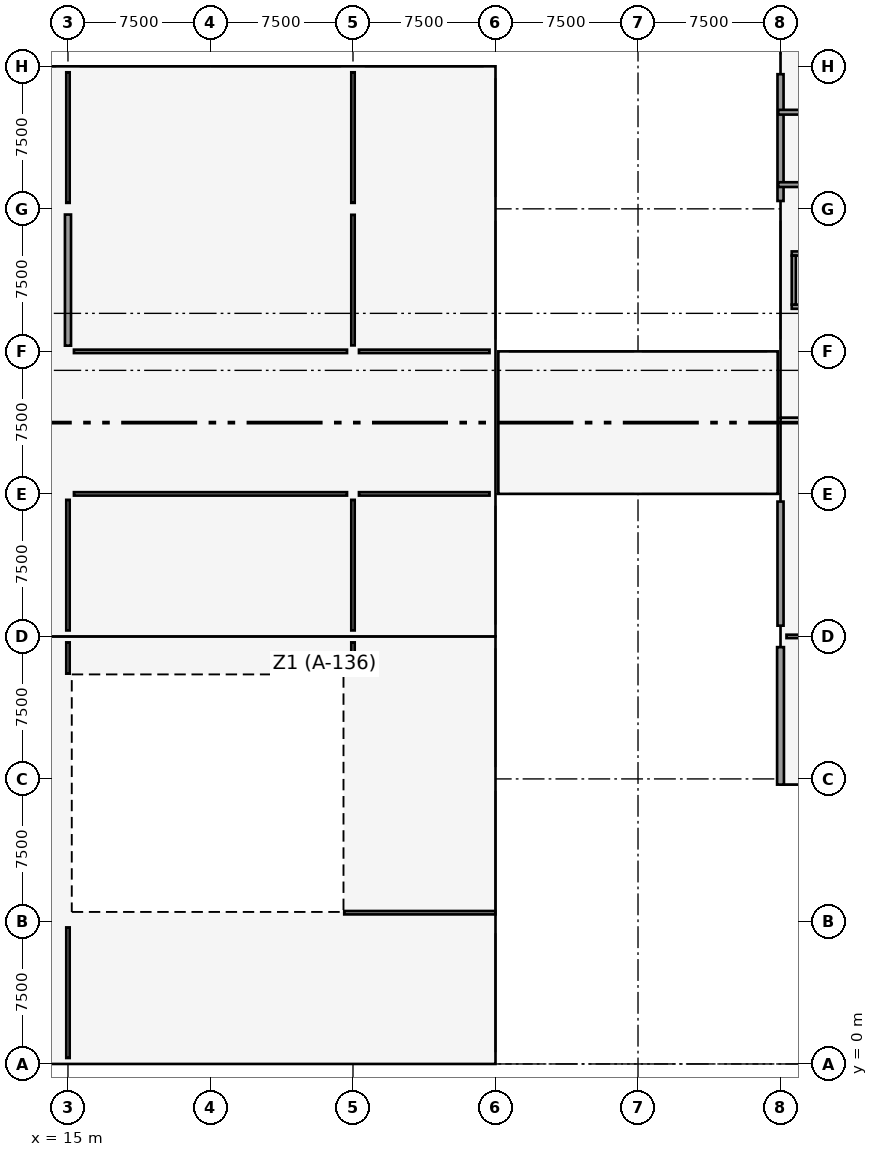
"""IFC4 building model, lengths in metres.
Left out: names, types, materials, properties, quantities, classifications, styles, units other than length and angle.
Written with IfcOpenShell. Run it as: python <this file> out.ifc"""

import sys

from ifc_helpers import new_model, si_unit, direction, frame, frame_2d, origin, origin_2d, place, context, subcontext, project, spatial, rectangle, extrude, element, fill, save


model = new_model("IFC4")
c1 = context("Model", 3, precision=1e-05, world=origin(), true_north=direction((0.0, 1.0)))
c2 = subcontext(c1, "Body", "Model", "MODEL_VIEW")
j1 = project(units=[si_unit("LENGTHUNIT", "METRE"), si_unit("PLANEANGLEUNIT", "RADIAN")], contexts=[c1])
p1 = place(None, origin())
s1 = spatial("IfcSite", under=j1, at=p1, CompositionType="ELEMENT")
p2 = place(p1, origin())
s2 = spatial("IfcBuilding", under=s1, at=p2, CompositionType="ELEMENT")
p3 = place(p2, frame((0.0, 0.0, 9.0)))
s3 = spatial("IfcBuildingStorey", under=s2, at=p3, CompositionType="ELEMENT", Elevation=9.0)
p4 = place(p3, frame((52.5, 22.5, 0.0), z_axis=(0.0, 0.0, 1.0), x_axis=(1.0, 0.0, 0.0)))
e1 = element("IfcColumn", 1, at=p4, inside=s3, PredefinedType="COLUMN", context=c2, shape_type="SweptSolid", body=[
    extrude(rectangle(XDim=0.6, YDim=1.1, at=origin_2d()), origin(), (0.0, 0.0, 1.0), 4.2),
])
for number, where, z_axis, x_axis in (
    (2, (52.5, 30.0, 0.0), (0.0, 0.0, 1.0), (1.0, 0.0, 0.0)),
    (3, (52.5, 37.5, 0.0), (0.0, 0.0, 1.0), (1.0, 0.0, 0.0)),
    (4, (52.5, 45.0, 0.0), (0.0, 0.0, 1.0), (1.0, 0.0, 0.0)),
    (5, (52.5, 52.5, 0.0), (0.0, 0.0, 1.0), (1.0, 0.0, 0.0)),
):
    element("IfcColumn", number, at=place(p3, frame(where, z_axis=z_axis, x_axis=x_axis)), inside=s3, PredefinedType="COLUMN", context=c2, shape_type="SweptSolid", body=[
        extrude(rectangle(XDim=0.8, YDim=0.8, at=origin_2d()), origin(), (0.0, 0.0, 1.0), 4.2),
    ])
for number, where, z_axis, x_axis in (
    (6, (15.0, 0.0, 0.0), (0.0, 0.0, 1.0), (1.0, 0.0, 0.0)),
    (7, (15.0, 7.5, 0.0), (0.0, 0.0, 1.0), (1.0, 0.0, 0.0)),
    (8, (15.0, 15.0, 0.0), (0.0, 0.0, 1.0), (1.0, 0.0, 0.0)),
    (9, (15.0, 22.5, 0.0), (0.0, 0.0, 1.0), (1.0, 0.0, 0.0)),
    (10, (15.0, 30.0, 0.0), (0.0, 0.0, 1.0), (1.0, 0.0, 0.0)),
    (11, (15.0, 37.5, 0.0), (0.0, 0.0, 1.0), (1.0, 0.0, 0.0)),
    (12, (15.0, 45.0, 0.0), (0.0, 0.0, 1.0), (1.0, 0.0, 0.0)),
    (13, (15.0, 52.5, 0.0), (0.0, 0.0, 1.0), (1.0, 0.0, 0.0)),
    (14, (30.0, 0.0, 0.0), (0.0, 0.0, 1.0), (1.0, 0.0, 0.0)),
    (15, (30.0, 7.5, 0.0), (0.0, 0.0, 1.0), (1.0, 0.0, 0.0)),
    (16, (30.0, 15.0, 0.0), (0.0, 0.0, 1.0), (1.0, 0.0, 0.0)),
    (17, (30.0, 22.5, 0.0), (0.0, 0.0, 1.0), (1.0, 0.0, 0.0)),
    (18, (30.0, 30.0, 0.0), (0.0, 0.0, 1.0), (1.0, 0.0, 0.0)),
    (19, (30.0, 37.5, 0.0), (0.0, 0.0, 1.0), (1.0, 0.0, 0.0)),
    (20, (30.0, 45.0, 0.0), (0.0, 0.0, 1.0), (1.0, 0.0, 0.0)),
    (21, (30.0, 52.5, 0.0), (0.0, 0.0, 1.0), (1.0, 0.0, 0.0)),
    (22, (37.5, 0.0, 0.0), (0.0, 0.0, 1.0), (1.0, 0.0, 0.0)),
    (23, (37.5, 7.5, 0.0), (0.0, 0.0, 1.0), (1.0, 0.0, 0.0)),
    (24, (37.5, 15.0, 0.0), (0.0, 0.0, 1.0), (1.0, 0.0, 0.0)),
    (25, (37.5, 22.5, 0.0), (0.0, 0.0, 1.0), (1.0, 0.0, 0.0)),
    (26, (37.5, 30.0, 0.0), (0.0, 0.0, 1.0), (1.0, 0.0, 0.0)),
    (27, (37.5, 37.5, 0.0), (0.0, 0.0, 1.0), (1.0, 0.0, 0.0)),
    (28, (37.5, 45.0, 0.0), (0.0, 0.0, 1.0), (1.0, 0.0, 0.0)),
    (29, (37.5, 52.5, 0.0), (0.0, 0.0, 1.0), (1.0, 0.0, 0.0)),
):
    element("IfcColumn", number, at=place(p3, frame(where, z_axis=z_axis, x_axis=x_axis)), inside=s3, PredefinedType="COLUMN", context=c2, shape_type="SweptSolid", body=[
        extrude(rectangle(XDim=0.6, YDim=0.6, at=origin_2d()), origin(), (0.0, 0.0, 1.0), 4.2),
    ])
p5 = place(p3, frame((15.0, 37.8, 0.0), z_axis=(0.0, 0.0, 1.0), x_axis=(0.0, 1.0, 0.0)))
e30 = element("IfcWall", 30, at=p5, inside=s3, PredefinedType="SHEAR", context=c2, shape_type="SweptSolid", body=[
    extrude(rectangle(XDim=6.9, YDim=0.32, at=frame_2d((3.45, 0.0))), origin(), (0.0, 0.0, 1.0), 3.9),
])
p6 = place(p3, frame((52.5, 14.7, 0.0), z_axis=(0.0, 0.0, 1.0), x_axis=(0.0, 1.0, 0.0)))
e31 = element("IfcWall", 31, at=p6, inside=s3, PredefinedType="SOLIDWALL", context=c2, shape_type="SweptSolid", body=[
    extrude(rectangle(XDim=7.235, YDim=0.36, at=frame_2d((3.618, 0.0))), origin(), (0.0, 0.0, 1.0), 2.69),
])
p7 = place(p3, frame((52.5, 23.065, 0.0), z_axis=(0.0, 0.0, 1.0), x_axis=(0.0, 1.0, 0.0)))
e32 = element("IfcWall", 32, at=p7, inside=s3, PredefinedType="SOLIDWALL", context=c2, shape_type="SweptSolid", body=[
    extrude(rectangle(XDim=6.53, YDim=0.32, at=frame_2d((3.265, 0.0))), origin(), (0.0, 0.0, 1.0), 2.69),
])
p8 = place(p3, frame((52.5, 45.415, 0.0), z_axis=(0.0, 0.0, 1.0), x_axis=(0.0, 1.0, 0.0)))
e33 = element("IfcWall", 33, at=p8, inside=s3, PredefinedType="SOLIDWALL", context=c2, shape_type="SweptSolid", body=[
    extrude(rectangle(XDim=6.67, YDim=0.32, at=frame_2d((3.335, 0.0))), origin(), (0.0, 0.0, 1.0), 2.97),
])
p9 = place(p3, frame((52.38, 46.275, 0.0), z_axis=(0.0, 0.0, 1.0), x_axis=(1.0, 0.0, 0.0)))
e34 = element("IfcWall", 34, at=p9, inside=s3, PredefinedType="SOLIDWALL", context=c2, shape_type="SweptSolid", body=[
    extrude(rectangle(XDim=7.26, YDim=0.25, at=frame_2d((3.63, 0.0))), origin(), (0.0, 0.0, 1.0), 3.92),
])
p10 = place(p9, frame((0.62, 0.0, 0.0)))
e35 = element("IfcOpeningElement", 35, at=p10, cuts=e34, PredefinedType="OPENING", context=c2, shape_type="SweptSolid", body=[
    extrude(rectangle(XDim=1.1, YDim=2.15, at=frame_2d((0.55, 1.075))), frame((0.0, 0.135, 0.0), z_axis=(0.0, -1.0, 0.0), x_axis=(1.0, 0.0, 0.0)), (0.0, 0.0, 1.0), 0.27),
])
p11 = place(p3, frame((52.38, 50.085, 0.0), z_axis=(0.0, 0.0, 1.0), x_axis=(1.0, 0.0, 0.0)))
e36 = element("IfcWall", 36, at=p11, inside=s3, PredefinedType="SOLIDWALL", context=c2, shape_type="SweptSolid", body=[
    extrude(rectangle(XDim=7.26, YDim=0.25, at=frame_2d((3.63, 0.0))), origin(), (0.0, 0.0, 1.0), 3.92),
])
p12 = place(p11, frame((0.62, 0.0, 0.0)))
e37 = element("IfcOpeningElement", 37, at=p12, cuts=e36, PredefinedType="OPENING", context=c2, shape_type="SweptSolid", body=[
    extrude(rectangle(XDim=1.1, YDim=2.15, at=frame_2d((0.55, 1.075))), frame((0.0, 0.135, 0.0), z_axis=(0.0, -1.0, 0.0), x_axis=(1.0, 0.0, 0.0)), (0.0, 0.0, 1.0), 0.27),
])
for number, where, z_axis, x_axis in (
    (38, (53.09, 39.85, 0.0), (0.0, 0.0, 1.0), (1.0, 0.0, 0.0)),
    (39, (53.09, 42.65, 0.0), (0.0, 0.0, 1.0), (1.0, 0.0, 0.0)),
):
    element("IfcWall", number, at=place(p3, frame(where, z_axis=z_axis, x_axis=x_axis)), inside=s3, PredefinedType="SOLIDWALL", context=c2, shape_type="SweptSolid", body=[
        extrude(rectangle(XDim=2.62, YDim=0.22, at=frame_2d((1.31, 0.0))), origin(), (0.0, 0.0, 1.0), 3.92),
    ])
p13 = place(p3, frame((53.2, 39.96, 0.0), z_axis=(0.0, 0.0, 1.0), x_axis=(0.0, 1.0, 0.0)))
e40 = element("IfcWall", 40, at=p13, inside=s3, PredefinedType="SOLIDWALL", context=c2, shape_type="SweptSolid", body=[
    extrude(rectangle(XDim=2.58, YDim=0.22, at=frame_2d((1.29, 0.0))), origin(), (0.0, 0.0, 1.0), 3.92),
])
p14 = place(p3, frame((29.54, 7.96, 0.0), z_axis=(0.0, 0.0, 1.0), x_axis=(1.0, 0.0, 0.0)))
e41 = element("IfcWall", 41, at=p14, inside=s3, PredefinedType="PARTITIONING", context=c2, shape_type="SweptSolid", body=[
    extrude(rectangle(XDim=7.96, YDim=0.18, at=frame_2d((3.98, 0.0))), origin(), (0.0, 0.0, 1.0), 2.87),
])
p15 = place(p14, frame((3.46, 0.0, 0.0)))
e42 = element("IfcOpeningElement", 42, at=p15, cuts=e41, PredefinedType="OPENING", context=c2, shape_type="SweptSolid", body=[
    extrude(rectangle(XDim=1.5, YDim=2.16, at=frame_2d((0.75, 1.08))), frame((0.0, 0.1, 0.0), z_axis=(0.0, -1.0, 0.0), x_axis=(1.0, 0.0, 0.0)), (0.0, 0.0, 1.0), 0.2),
])
p16 = place(p3, frame((15.314, 30.0, 0.0), z_axis=(0.0, 0.0, 1.0), x_axis=(1.0, 0.0, 0.0)))
e43 = element("IfcWall", 43, at=p16, inside=s3, PredefinedType="PARTITIONING", context=c2, shape_type="SweptSolid", body=[
    extrude(rectangle(XDim=14.372, YDim=0.18, at=frame_2d((7.186, 0.0))), origin(), (0.0, 0.0, 1.0), 2.87),
])
p17 = place(p3, frame((30.314, 30.0, 0.0), z_axis=(0.0, 0.0, 1.0), x_axis=(1.0, 0.0, 0.0)))
e44 = element("IfcWall", 44, at=p17, inside=s3, PredefinedType="PARTITIONING", context=c2, shape_type="SweptSolid", body=[
    extrude(rectangle(XDim=6.872, YDim=0.18, at=frame_2d((3.436, 0.0))), origin(), (0.0, 0.0, 1.0), 2.87),
])
p18 = place(p17, frame((2.686, 0.0, 0.0)))
e45 = element("IfcOpeningElement", 45, at=p18, cuts=e44, PredefinedType="OPENING", context=c2, shape_type="SweptSolid", body=[
    extrude(rectangle(XDim=1.5, YDim=2.16, at=frame_2d((0.75, 1.08))), frame((0.0, 0.1, 0.0), z_axis=(0.0, -1.0, 0.0), x_axis=(1.0, 0.0, 0.0)), (0.0, 0.0, 1.0), 0.2),
])
p19 = place(p3, frame((15.314, 37.5, 0.0), z_axis=(0.0, 0.0, 1.0), x_axis=(1.0, 0.0, 0.0)))
e46 = element("IfcWall", 46, at=p19, inside=s3, PredefinedType="PARTITIONING", context=c2, shape_type="SweptSolid", body=[
    extrude(rectangle(XDim=14.372, YDim=0.18, at=frame_2d((7.186, 0.0))), origin(), (0.0, 0.0, 1.0), 2.87),
])
p20 = place(p3, frame((30.314, 37.5, 0.0), z_axis=(0.0, 0.0, 1.0), x_axis=(1.0, 0.0, 0.0)))
e47 = element("IfcWall", 47, at=p20, inside=s3, PredefinedType="PARTITIONING", context=c2, shape_type="SweptSolid", body=[
    extrude(rectangle(XDim=6.872, YDim=0.18, at=frame_2d((3.436, 0.0))), origin(), (0.0, 0.0, 1.0), 2.87),
])
p21 = place(p20, frame((2.711, 0.0, 0.0)))
e48 = element("IfcOpeningElement", 48, at=p21, cuts=e47, PredefinedType="OPENING", context=c2, shape_type="SweptSolid", body=[
    extrude(rectangle(XDim=1.45, YDim=2.15, at=frame_2d((0.725, 1.075))), frame((0.0, 0.1, 0.0), z_axis=(0.0, -1.0, 0.0), x_axis=(1.0, 0.0, 0.0)), (0.0, 0.0, 1.0), 0.2),
])
p22 = place(p3, frame((30.0, 20.54, 0.0), z_axis=(0.0, 0.0, 1.0), x_axis=(0.0, 1.0, 0.0)))
e49 = element("IfcWall", 49, at=p22, inside=s3, PredefinedType="PARTITIONING", context=c2, shape_type="SweptSolid", body=[
    extrude(rectangle(XDim=1.646, YDim=0.18, at=frame_2d((0.823, 0.0))), origin(), (0.0, 0.0, 1.0), 2.82),
])
p23 = place(p3, frame((30.0, 22.814, 0.0), z_axis=(0.0, 0.0, 1.0), x_axis=(0.0, 1.0, 0.0)))
e50 = element("IfcWall", 50, at=p23, inside=s3, PredefinedType="PARTITIONING", context=c2, shape_type="SweptSolid", body=[
    extrude(rectangle(XDim=6.872, YDim=0.18, at=frame_2d((3.436, 0.0))), origin(), (0.0, 0.0, 1.0), 2.82),
])
for number, where, z_axis, x_axis in (
    (51, (30.0, 37.814, 0.0), (0.0, 0.0, 1.0), (0.0, 1.0, 0.0)),
    (52, (30.0, 45.314, 0.0), (0.0, 0.0, 1.0), (0.0, 1.0, 0.0)),
):
    element("IfcWall", number, at=place(p3, frame(where, z_axis=z_axis, x_axis=x_axis)), inside=s3, PredefinedType="PARTITIONING", context=c2, shape_type="SweptSolid", body=[
        extrude(rectangle(XDim=6.872, YDim=0.18, at=frame_2d((3.436, 0.0))), origin(), (0.0, 0.0, 1.0), 2.87),
    ])
p24 = place(p3, frame((15.0, 0.314, 0.0), z_axis=(0.0, 0.0, 1.0), x_axis=(0.0, 1.0, 0.0)))
e53 = element("IfcWall", 53, at=p24, inside=s3, PredefinedType="PARTITIONING", context=c2, shape_type="SweptSolid", body=[
    extrude(rectangle(XDim=6.872, YDim=0.18, at=frame_2d((3.436, 0.0))), origin(), (0.0, 0.0, 1.0), 2.87),
])
p25 = place(p24, frame((2.686, 0.0, 0.0)))
e54 = element("IfcOpeningElement", 54, at=p25, cuts=e53, PredefinedType="OPENING", context=c2, shape_type="SweptSolid", body=[
    extrude(rectangle(XDim=1.5, YDim=2.16, at=frame_2d((0.75, 1.08))), frame((0.0, 0.1, 0.0), z_axis=(0.0, -1.0, 0.0), x_axis=(1.0, 0.0, 0.0)), (0.0, 0.0, 1.0), 0.2),
])
p26 = place(p3, frame((15.0, 20.54, 0.0), z_axis=(0.0, 0.0, 1.0), x_axis=(0.0, 1.0, 0.0)))
e55 = element("IfcWall", 55, at=p26, inside=s3, PredefinedType="PARTITIONING", context=c2, shape_type="SweptSolid", body=[
    extrude(rectangle(XDim=1.646, YDim=0.18, at=frame_2d((0.823, 0.0))), origin(), (0.0, 0.0, 1.0), 2.87),
])
p27 = place(p3, frame((15.0, 22.814, 0.0), z_axis=(0.0, 0.0, 1.0), x_axis=(0.0, 1.0, 0.0)))
e56 = element("IfcWall", 56, at=p27, inside=s3, PredefinedType="PARTITIONING", context=c2, shape_type="SweptSolid", body=[
    extrude(rectangle(XDim=6.872, YDim=0.18, at=frame_2d((3.436, 0.0))), origin(), (0.0, 0.0, 1.0), 2.87),
])
p28 = place(p27, frame((2.711, 0.0, 0.0)))
e57 = element("IfcOpeningElement", 57, at=p28, cuts=e56, PredefinedType="OPENING", context=c2, shape_type="SweptSolid", body=[
    extrude(rectangle(XDim=1.45, YDim=2.15, at=frame_2d((0.725, 1.075))), frame((0.0, 0.1, 0.0), z_axis=(0.0, -1.0, 0.0), x_axis=(1.0, 0.0, 0.0)), (0.0, 0.0, 1.0), 0.2),
])
p29 = place(p3, frame((15.0, 45.314, 0.0), z_axis=(0.0, 0.0, 1.0), x_axis=(0.0, 1.0, 0.0)))
e58 = element("IfcWall", 58, at=p29, inside=s3, PredefinedType="PARTITIONING", context=c2, shape_type="SweptSolid", body=[
    extrude(rectangle(XDim=6.872, YDim=0.18, at=frame_2d((3.436, 0.0))), origin(), (0.0, 0.0, 1.0), 2.87),
])
p30 = place(p29, frame((2.786, 0.0, 0.0)))
e59 = element("IfcOpeningElement", 59, at=p30, cuts=e58, PredefinedType="OPENING", context=c2, shape_type="SweptSolid", body=[
    extrude(rectangle(XDim=1.3, YDim=2.15, at=frame_2d((0.65, 1.075))), frame((0.0, 0.1, 0.0), z_axis=(0.0, -1.0, 0.0), x_axis=(1.0, 0.0, 0.0)), (0.0, 0.0, 1.0), 0.2),
])
p31 = place(p3, frame((52.814, 22.5, 0.0), z_axis=(0.0, 0.0, 1.0), x_axis=(1.0, 0.0, 0.0)))
e60 = element("IfcWall", 60, at=p31, inside=s3, PredefinedType="PARTITIONING", context=c2, shape_type="SweptSolid", body=[
    extrude(rectangle(XDim=6.772, YDim=0.18, at=frame_2d((3.386, 0.0))), origin(), (0.0, 0.0, 1.0), 2.69),
])
p32 = place(p31, frame((2.786, 0.0, 0.0)))
e61 = element("IfcOpeningElement", 61, at=p32, cuts=e60, PredefinedType="OPENING", context=c2, shape_type="SweptSolid", body=[
    extrude(rectangle(XDim=1.3, YDim=2.15, at=frame_2d((0.65, 1.075))), frame((0.0, 0.1, 0.0), z_axis=(0.0, -1.0, 0.0), x_axis=(1.0, 0.0, 0.0)), (0.0, 0.0, 1.0), 0.2),
])
p33 = place(p10, origin())
e62 = element("IfcDoor", 62, at=p33, inside=s3, OperationType="SINGLE_SWING_LEFT", PredefinedType="DOOR", context=c2, shape_type="SweptSolid", body=[
    extrude(rectangle(XDim=1.1, YDim=2.15, at=frame_2d((0.55, 1.075))), frame((0.0, 0.025, 0.0), z_axis=(0.0, -1.0, 0.0), x_axis=(1.0, 0.0, 0.0)), (0.0, 0.0, 1.0), 0.05),
])
fill(e35, e62)
p34 = place(p12, frame((1.1, 0.0, 0.0), z_axis=(0.0, 0.0, 1.0), x_axis=(-1.0, 0.0, 0.0)))
e63 = element("IfcDoor", 63, at=p34, inside=s3, OperationType="SINGLE_SWING_RIGHT", PredefinedType="DOOR", context=c2, shape_type="SweptSolid", body=[
    extrude(rectangle(XDim=1.1, YDim=2.15, at=frame_2d((0.55, 1.075))), frame((0.0, 0.025, 0.0), z_axis=(0.0, -1.0, 0.0), x_axis=(1.0, 0.0, 0.0)), (0.0, 0.0, 1.0), 0.05),
])
fill(e37, e63)
p35 = place(p15, origin())
e64 = element("IfcDoor", 64, at=p35, inside=s3, OperationType="SINGLE_SWING_RIGHT", PredefinedType="DOOR", context=c2, shape_type="SweptSolid", body=[
    extrude(rectangle(XDim=1.5, YDim=2.16, at=frame_2d((0.75, 1.08))), frame((0.0, 0.025, 0.0), z_axis=(0.0, -1.0, 0.0), x_axis=(1.0, 0.0, 0.0)), (0.0, 0.0, 1.0), 0.05),
])
fill(e42, e64)
p36 = place(p18, origin())
e65 = element("IfcDoor", 65, at=p36, inside=s3, OperationType="SINGLE_SWING_LEFT", PredefinedType="DOOR", context=c2, shape_type="SweptSolid", body=[
    extrude(rectangle(XDim=1.5, YDim=2.16, at=frame_2d((0.75, 1.08))), frame((0.0, 0.025, 0.0), z_axis=(0.0, -1.0, 0.0), x_axis=(1.0, 0.0, 0.0)), (0.0, 0.0, 1.0), 0.05),
])
fill(e45, e65)
p37 = place(p21, origin())
e66 = element("IfcDoor", 66, at=p37, inside=s3, OperationType="SINGLE_SWING_RIGHT", PredefinedType="DOOR", context=c2, shape_type="SweptSolid", body=[
    extrude(rectangle(XDim=1.45, YDim=2.15, at=frame_2d((0.725, 1.075))), frame((0.0, 0.025, 0.0), z_axis=(0.0, -1.0, 0.0), x_axis=(1.0, 0.0, 0.0)), (0.0, 0.0, 1.0), 0.05),
])
fill(e48, e66)
p38 = place(p25, origin())
e67 = element("IfcDoor", 67, at=p38, inside=s3, OperationType="SINGLE_SWING_LEFT", PredefinedType="DOOR", context=c2, shape_type="SweptSolid", body=[
    extrude(rectangle(XDim=1.5, YDim=2.16, at=frame_2d((0.75, 1.08))), frame((0.0, 0.025, 0.0), z_axis=(0.0, -1.0, 0.0), x_axis=(1.0, 0.0, 0.0)), (0.0, 0.0, 1.0), 0.05),
])
fill(e54, e67)
p39 = place(p28, origin())
e68 = element("IfcDoor", 68, at=p39, inside=s3, OperationType="SINGLE_SWING_RIGHT", PredefinedType="DOOR", context=c2, shape_type="SweptSolid", body=[
    extrude(rectangle(XDim=1.45, YDim=2.15, at=frame_2d((0.725, 1.075))), frame((0.0, 0.025, 0.0), z_axis=(0.0, -1.0, 0.0), x_axis=(1.0, 0.0, 0.0)), (0.0, 0.0, 1.0), 0.05),
])
fill(e57, e68)
p40 = place(p30, origin())
e69 = element("IfcDoor", 69, at=p40, inside=s3, OperationType="SINGLE_SWING_LEFT", PredefinedType="DOOR", context=c2, shape_type="SweptSolid", body=[
    extrude(rectangle(XDim=1.3, YDim=2.15, at=frame_2d((0.65, 1.075))), frame((0.0, 0.025, 0.0), z_axis=(0.0, -1.0, 0.0), x_axis=(1.0, 0.0, 0.0)), (0.0, 0.0, 1.0), 0.05),
])
fill(e59, e69)
save(model, sys.argv[1])
